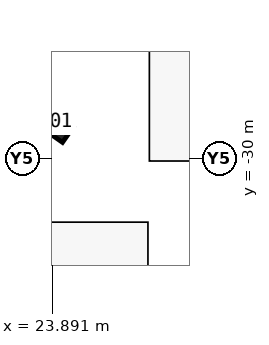
"""IFC4 building model, lengths in metres.
Left out: names, types, materials, properties, quantities, classifications, styles, units other than length and angle.
Written with IfcOpenShell. Run it as: python <this file> out.ifc"""

import sys

from ifc_helpers import new_model, si_unit, direction, frame, origin, origin_2d, place, context, subcontext, project, spatial, rectangle, extrude, element, save


model = new_model("IFC4")
c1 = context("Model", 3, precision=1e-05, world=origin(), true_north=direction((0.0, 1.0)))
c2 = subcontext(c1, "Body", "Model", "MODEL_VIEW")
j1 = project(units=[si_unit("LENGTHUNIT", "METRE"), si_unit("PLANEANGLEUNIT", "RADIAN")], contexts=[c1])
p1 = place(None, origin())
s1 = spatial("IfcSite", under=j1, at=p1, CompositionType="ELEMENT")
p2 = place(p1, origin())
s2 = spatial("IfcBuilding", under=s1, at=p2, CompositionType="ELEMENT")
p3 = place(p2, frame((0.0, 0.0, -9.0)))
s3 = spatial("IfcBuildingStorey", under=s2, at=p3, CompositionType="ELEMENT", Elevation=-9.0)
p4 = place(p3, frame((23.782, -28.799, 0.0), z_axis=(0.0, 0.0, 1.0), x_axis=(0.819152044289, -0.573576436351, 0.0)))
e1 = element("IfcColumn", 1, at=p4, inside=s3, PredefinedType="COLUMN", context=c2, shape_type="SweptSolid", body=[
    extrude(rectangle(XDim=1.5, YDim=0.6, at=origin_2d()), origin(), (0.0, 0.0, 1.0), 4.5),
])
save(model, sys.argv[1])
